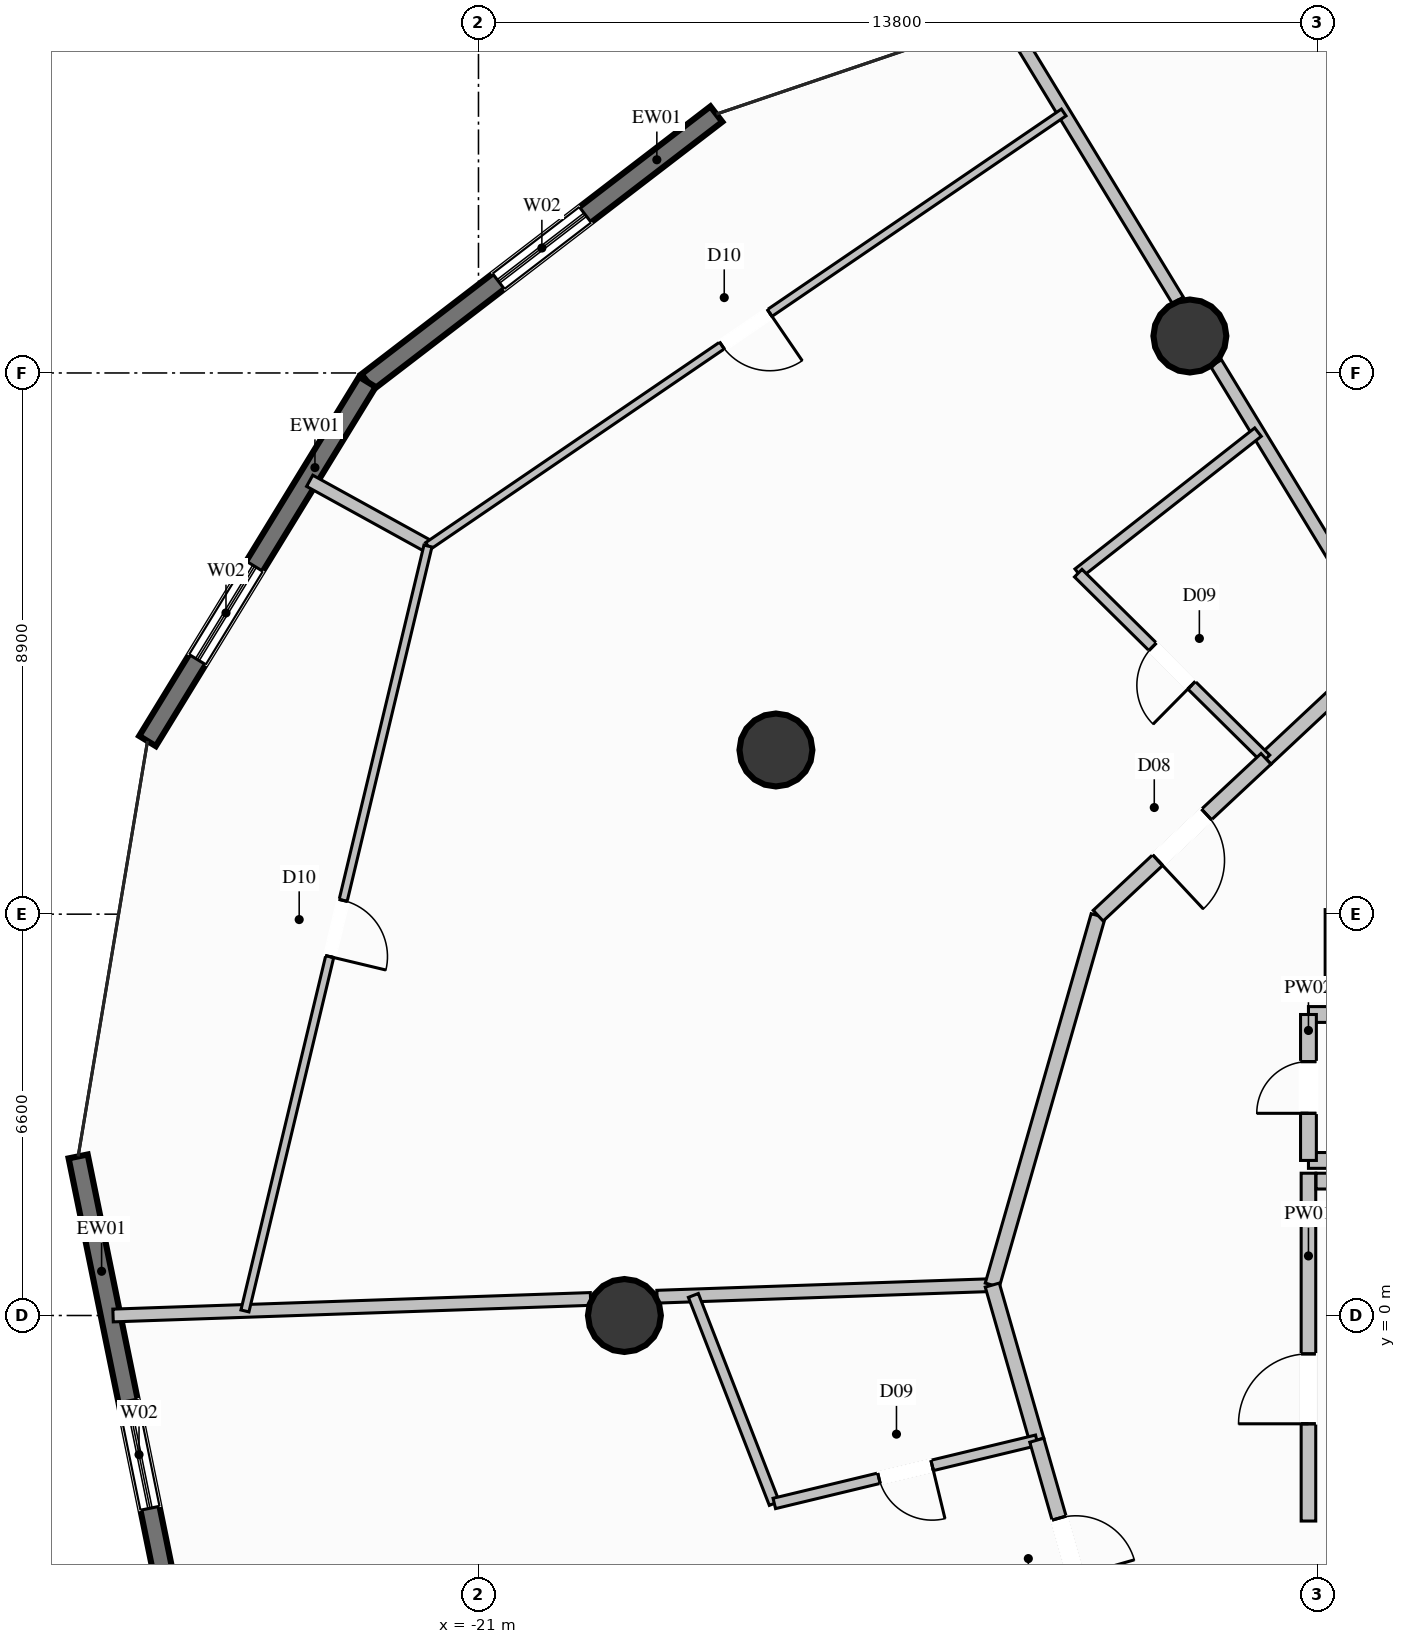
"""IFC4 building model, lengths in metres.
Left out: names, types, materials, properties, quantities, classifications, styles, units other than length and angle.
Written with IfcOpenShell. Run it as: python <this file> out.ifc"""

import sys

from ifc_helpers import new_model, si_unit, direction, frame, frame_2d, origin, origin_2d, place, context, subcontext, project, spatial, rectangle, circle, extrude, element, fill, save


model = new_model("IFC4")
c1 = context("Model", 3, precision=1e-05, world=origin(), true_north=direction((0.0, 1.0)))
c2 = subcontext(c1, "Body", "Model", "MODEL_VIEW")
j1 = project(units=[si_unit("LENGTHUNIT", "METRE"), si_unit("PLANEANGLEUNIT", "RADIAN")], contexts=[c1])
p1 = place(None, origin())
s1 = spatial("IfcSite", under=j1, at=p1, CompositionType="ELEMENT")
p2 = place(p1, origin())
s2 = spatial("IfcBuilding", under=s1, at=p2, CompositionType="ELEMENT")
p3 = place(p2, frame((0.0, 0.0, 75.2)))
s3 = spatial("IfcBuildingStorey", under=s2, at=p3, CompositionType="ELEMENT", Elevation=75.2)
p4 = place(p3, frame((-6.5, 6.1, 0.0), z_axis=(0.0, 0.0, 1.0), x_axis=(1.0, 0.0, 0.0)))
e1 = element("IfcColumn", 1, at=p4, inside=s3, PredefinedType="COLUMN", context=c2, shape_type="SweptSolid", body=[
    extrude(rectangle(XDim=1.1, YDim=1.1, at=origin_2d()), origin(), (0.0, 0.0, 1.0), 3.6),
])
for number, where, z_axis, x_axis in (
    (2, (-9.3, 16.108, 0.0), (0.0, 0.0, 1.0), (1.0, 0.0, 0.0)),
    (3, (-16.108, 9.3, 0.0), (0.0, 0.0, 1.0), (1.0, 0.0, 0.0)),
    (4, (-18.6, 0.0, 0.0), (0.0, 0.0, 1.0), (1.0, 0.0, 0.0)),
):
    element("IfcColumn", number, at=place(p3, frame(where, z_axis=z_axis, x_axis=x_axis)), inside=s3, PredefinedType="COLUMN", context=c2, shape_type="SweptSolid", body=[
        extrude(circle(Radius=0.6, at=origin_2d()), origin(), (0.0, 0.0, 1.0), 3.6),
    ])
p5 = place(p3, frame((-22.827, 15.353, 0.0), z_axis=(0.0, 0.0, 1.0), x_axis=(0.793329795388, 0.608792112095, 0.0)))
e5 = element("IfcWall", 5, at=p5, inside=s3, PredefinedType="SOLIDWALL", context=c2, shape_type="SweptSolid", body=[
    extrude(rectangle(XDim=7.234, YDim=0.32, at=frame_2d((3.617, 0.0))), origin(), (0.0, 0.0, 1.0), 3.34),
])
p6 = place(p5, frame((2.717, 0.0, 0.35)))
e6 = element("IfcOpeningElement", 6, at=p6, cuts=e5, PredefinedType="OPENING", context=c2, shape_type="SweptSolid", body=[
    extrude(rectangle(XDim=1.8, YDim=2.6, at=frame_2d((0.9, 1.3))), frame((0.0, 0.17, 0.0), z_axis=(0.0, -1.0, 0.0), x_axis=(1.0, 0.0, 0.0)), (0.0, 0.0, 1.0), 0.34),
])
p7 = place(p3, frame((-26.443, 9.447, 0.0), z_axis=(0.0, 0.0, 1.0), x_axis=(0.522184211397, 0.852832720625, 0.0)))
e7 = element("IfcWall", 7, at=p7, inside=s3, PredefinedType="SOLIDWALL", context=c2, shape_type="SweptSolid", body=[
    extrude(rectangle(XDim=6.925, YDim=0.32, at=frame_2d((3.462, 0.0))), origin(), (0.0, 0.0, 1.0), 3.34),
])
p8 = place(p7, frame((1.571, 0.0, 0.35)))
e8 = element("IfcOpeningElement", 8, at=p8, cuts=e7, PredefinedType="OPENING", context=c2, shape_type="SweptSolid", body=[
    extrude(rectangle(XDim=1.8, YDim=2.6, at=frame_2d((0.9, 1.3))), frame((0.0, 0.17, 0.0), z_axis=(0.0, -1.0, 0.0), x_axis=(1.0, 0.0, 0.0)), (0.0, 0.0, 1.0), 0.34),
])
p9 = place(p3, frame((-26.137, -4.471, 0.0), z_axis=(0.0, 0.0, 1.0), x_axis=(-0.200054576405, 0.979784755168, 0.0)))
e9 = element("IfcWall", 9, at=p9, inside=s3, PredefinedType="SOLIDWALL", context=c2, shape_type="SweptSolid", body=[
    extrude(rectangle(XDim=7.233, YDim=0.32, at=frame_2d((3.617, 0.0))), origin(), (0.0, 0.0, 1.0), 3.34),
])
p10 = place(p9, frame((1.328, 0.0, 0.35)))
e10 = element("IfcOpeningElement", 10, at=p10, cuts=e9, PredefinedType="OPENING", context=c2, shape_type="SweptSolid", body=[
    extrude(rectangle(XDim=1.8, YDim=2.6, at=frame_2d((0.9, 1.3))), frame((0.0, 0.17, 0.0), z_axis=(0.0, -1.0, 0.0), x_axis=(1.0, 0.0, 0.0)), (0.0, 0.0, 1.0), 0.34),
])
p11 = place(p3, frame((-7.35, -3.38, 0.0), z_axis=(0.0, 0.0, 1.0), x_axis=(0.0, 1.0, 0.0)))
e11 = element("IfcWall", 11, at=p11, inside=s3, PredefinedType="PARTITIONING", context=c2, shape_type="SweptSolid", body=[
    extrude(rectangle(XDim=5.72, YDim=0.24, at=frame_2d((2.86, 0.0))), origin(), (0.0, 0.0, 1.0), 2.425),
])
p12 = place(p11, frame((1.599, 0.0, 0.0)))
e12 = element("IfcOpeningElement", 12, at=p12, cuts=e11, PredefinedType="OPENING", context=c2, shape_type="SweptSolid", body=[
    extrude(rectangle(XDim=1.15, YDim=2.2, at=frame_2d((0.575, 1.1))), frame((0.0, 0.13, 0.0), z_axis=(0.0, -1.0, 0.0), x_axis=(1.0, 0.0, 0.0)), (0.0, 0.0, 1.0), 0.26),
])
p13 = place(p3, frame((-7.225, 2.21, 0.0), z_axis=(0.0, 0.0, 1.0), x_axis=(1.0, 0.0, 0.0)))
e13 = element("IfcWall", 13, at=p13, inside=s3, PredefinedType="PARTITIONING", context=c2, shape_type="SweptSolid", body=[
    extrude(rectangle(XDim=0.875, YDim=0.26, at=frame_2d((0.438, 0.0))), origin(), (0.0, 0.0, 1.0), 3.34),
])
for number, where, z_axis, x_axis in (
    (14, (-7.35, 4.95, 0.0), (0.0, 0.0, 1.0), (1.0, 0.0, 0.0)),
    (15, (-7.35, 2.55, 0.0), (0.0, 0.0, 1.0), (1.0, 0.0, 0.0)),
):
    element("IfcWall", number, at=place(p3, frame(where, z_axis=z_axis, x_axis=x_axis)), inside=s3, PredefinedType="PARTITIONING", context=c2, shape_type="SweptSolid", body=[
        extrude(rectangle(XDim=0.93, YDim=0.26, at=frame_2d((0.465, 0.0))), origin(), (0.0, 0.0, 1.0), 3.34),
    ])
p14 = place(p3, frame((-7.35, 2.55, 0.0), z_axis=(0.0, 0.0, 1.0), x_axis=(0.0, 1.0, 0.0)))
e16 = element("IfcWall", 16, at=p14, inside=s3, PredefinedType="PARTITIONING", context=c2, shape_type="SweptSolid", body=[
    extrude(rectangle(XDim=2.4, YDim=0.26, at=frame_2d((1.2, 0.0))), origin(), (0.0, 0.0, 1.0), 2.425),
])
p15 = place(p14, frame((0.775, 0.0, 0.0)))
e17 = element("IfcOpeningElement", 17, at=p15, cuts=e16, PredefinedType="OPENING", context=c2, shape_type="SweptSolid", body=[
    extrude(rectangle(XDim=0.85, YDim=2.05, at=frame_2d((0.425, 1.025))), frame((0.0, 0.14, 0.0), z_axis=(0.0, -1.0, 0.0), x_axis=(1.0, 0.0, 0.0)), (0.0, 0.0, 1.0), 0.28),
])
p16 = place(p3, frame((-6.05, 11.022, 0.0), z_axis=(0.0, 0.0, 1.0), x_axis=(-0.519360576882, 0.85455520078, 0.0)))
e18 = element("IfcWall", 18, at=p16, inside=s3, PredefinedType="PARTITIONING", context=c2, shape_type="SweptSolid", body=[
    extrude(rectangle(XDim=5.43, YDim=0.21, at=frame_2d((2.715, 0.0))), origin(), (0.0, 0.0, 1.0), 2.709),
])
p17 = place(p3, frame((-9.498, 16.695, 0.0), z_axis=(0.0, 0.0, 1.0), x_axis=(-0.519352781988, 0.854559938121, 0.0)))
e19 = element("IfcWall", 19, at=p17, inside=s3, PredefinedType="PARTITIONING", context=c2, shape_type="SweptSolid", body=[
    extrude(rectangle(XDim=5.424, YDim=0.21, at=frame_2d((2.712, 0.0))), origin(), (0.0, 0.0, 1.0), 3.34),
])
p18 = place(p3, frame((-12.55, 0.5, 0.0), z_axis=(0.0, 0.0, 1.0), x_axis=(-0.999400889754, -0.034610136654, 0.0)))
e20 = element("IfcWall", 20, at=p18, inside=s3, PredefinedType="PARTITIONING", context=c2, shape_type="SweptSolid", body=[
    extrude(rectangle(XDim=5.516, YDim=0.21, at=frame_2d((2.758, 0.0))), origin(), (0.0, 0.0, 1.0), 2.42),
])
p19 = place(p3, frame((-19.157, 0.272, 0.0), z_axis=(0.0, 0.0, 1.0), x_axis=(-0.999400822075, -0.034612090897, 0.0)))
e21 = element("IfcWall", 21, at=p19, inside=s3, PredefinedType="PARTITIONING", context=c2, shape_type="SweptSolid", body=[
    extrude(rectangle(XDim=7.858, YDim=0.21, at=frame_2d((3.929, 0.0))), origin(), (0.0, 0.0, 1.0), 2.42),
])
p20 = place(p3, frame((-6.05, 11.022, 0.0), z_axis=(0.0, 0.0, 1.0), x_axis=(-0.730494026404, -0.682919085535, 0.0)))
e22 = element("IfcWall", 22, at=p20, inside=s3, PredefinedType="PARTITIONING", context=c2, shape_type="SweptSolid", body=[
    extrude(rectangle(XDim=2.735, YDim=0.24, at=frame_2d((1.368, 0.0))), origin(), (0.0, 0.0, 1.0), 3.34),
])
p21 = place(p3, frame((-8.18, 14.527, 0.0), z_axis=(0.0, 0.0, 1.0), x_axis=(-0.786773597638, -0.617241691771, 0.0)))
e23 = element("IfcWall", 23, at=p21, inside=s3, PredefinedType="PLUMBINGWALL", context=c2, shape_type="SweptSolid", body=[
    extrude(rectangle(XDim=3.757, YDim=0.175, at=frame_2d((1.878, 0.0))), origin(), (0.0, 0.0, 1.0), 3.34),
])
p22 = place(p3, frame((-8.048, 9.154, 0.0), z_axis=(0.0, 0.0, 1.0), x_axis=(-0.711002906065, 0.703189069573, 0.0)))
e24 = element("IfcWall", 24, at=p22, inside=s3, PredefinedType="PLUMBINGWALL", context=c2, shape_type="SweptSolid", body=[
    extrude(rectangle(XDim=4.343, YDim=0.175, at=frame_2d((2.171, 0.0))), origin(), (0.0, 0.0, 1.0), 3.34),
])
p23 = place(p22, frame((1.722, 0.0, 0.0)))
e25 = element("IfcOpeningElement", 25, at=p23, cuts=e24, PredefinedType="OPENING", context=c2, shape_type="SweptSolid", body=[
    extrude(rectangle(XDim=0.9, YDim=2.1, at=frame_2d((0.45, 1.05))), frame((0.0, 0.098, 0.0), z_axis=(0.0, -1.0, 0.0), x_axis=(1.0, 0.0, 0.0)), (0.0, 0.0, 1.0), 0.195),
])
p24 = place(p3, frame((-21.831, 12.654, 0.0), z_axis=(0.0, 0.0, 1.0), x_axis=(-0.875579287151, 0.483074437237, 0.0)))
e26 = element("IfcWall", 26, at=p24, inside=s3, PredefinedType="PARTITIONING", context=c2, shape_type="SweptSolid", body=[
    extrude(rectangle(XDim=2.221, YDim=0.21, at=frame_2d((1.111, 0.0))), origin(), (0.0, 0.0, 1.0), 3.34),
])
p25 = place(p3, frame((-10.808, 6.575, 0.0), z_axis=(0.0, 0.0, 1.0), x_axis=(-0.275634306148, -0.961262570412, 0.0)))
e27 = element("IfcWall", 27, at=p25, inside=s3, PredefinedType="PARTITIONING", context=c2, shape_type="SweptSolid", body=[
    extrude(rectangle(XDim=6.32, YDim=0.24, at=frame_2d((3.16, 0.0))), origin(), (0.0, 0.0, 1.0), 3.34),
])
p26 = place(p3, frame((-8.048, 9.154, 0.0), z_axis=(0.0, 0.0, 1.0), x_axis=(-0.73064678366, -0.682755649941, 0.0)))
e28 = element("IfcWall", 28, at=p26, inside=s3, PredefinedType="PARTITIONING", context=c2, shape_type="SweptSolid", body=[
    extrude(rectangle(XDim=3.778, YDim=0.24, at=frame_2d((1.889, 0.0))), origin(), (0.0, 0.0, 1.0), 3.34),
])
p27 = place(p26, frame((1.339, 0.0, 0.0)))
e29 = element("IfcOpeningElement", 29, at=p27, cuts=e28, PredefinedType="OPENING", context=c2, shape_type="SweptSolid", body=[
    extrude(rectangle(XDim=1.1, YDim=2.3, at=frame_2d((0.55, 1.15))), frame((0.0, 0.13, 0.0), z_axis=(0.0, -1.0, 0.0), x_axis=(1.0, 0.0, 0.0)), (0.0, 0.0, 1.0), 0.26),
])
p28 = place(p3, frame((-11.375, 19.784, 0.0), z_axis=(0.0, 0.0, 1.0), x_axis=(-0.826199588729, -0.563377528469, 0.0)))
e30 = element("IfcWall", 30, at=p28, inside=s3, PredefinedType="PARTITIONING", context=c2, shape_type="SweptSolid", body=[
    extrude(rectangle(XDim=12.656, YDim=0.135, at=frame_2d((6.328, 0.0))), origin(), (0.0, 0.0, 1.0), 3.34),
])
p29 = place(p28, frame((5.853, 0.0, 0.0)))
e31 = element("IfcOpeningElement", 31, at=p29, cuts=e30, PredefinedType="OPENING", context=c2, shape_type="SweptSolid", body=[
    extrude(rectangle(XDim=0.95, YDim=2.1, at=frame_2d((0.475, 1.05))), frame((0.0, 0.078, 0.0), z_axis=(0.0, -1.0, 0.0), x_axis=(1.0, 0.0, 0.0)), (0.0, 0.0, 1.0), 0.155),
])
p30 = place(p3, frame((-21.831, 12.654, 0.0), z_axis=(0.0, 0.0, 1.0), x_axis=(-0.232716823602, -0.972544538832, 0.0)))
e32 = element("IfcWall", 32, at=p30, inside=s3, PredefinedType="PARTITIONING", context=c2, shape_type="SweptSolid", body=[
    extrude(rectangle(XDim=12.934, YDim=0.135, at=frame_2d((6.467, 0.0))), origin(), (0.0, 0.0, 1.0), 3.34),
])
p31 = place(p30, frame((5.992, 0.0, 0.0)))
e33 = element("IfcOpeningElement", 33, at=p31, cuts=e32, PredefinedType="OPENING", context=c2, shape_type="SweptSolid", body=[
    extrude(rectangle(XDim=0.95, YDim=2.1, at=frame_2d((0.475, 1.05))), frame((0.0, 0.078, 0.0), z_axis=(0.0, -1.0, 0.0), x_axis=(1.0, 0.0, 0.0)), (0.0, 0.0, 1.0), 0.155),
])
p32 = place(p3, frame((-12.55, 0.5, 0.0), z_axis=(0.0, 0.0, 1.0), x_axis=(0.275790140823, -0.961217872402, 0.0)))
e34 = element("IfcWall", 34, at=p32, inside=s3, PredefinedType="PARTITIONING", context=c2, shape_type="SweptSolid", body=[
    extrude(rectangle(XDim=2.654, YDim=0.24, at=frame_2d((1.327, 0.0))), origin(), (0.0, 0.0, 1.0), 3.34),
])
p33 = place(p3, frame((-17.466, 0.33, 0.0), z_axis=(0.0, 0.0, 1.0), x_axis=(0.362590680008, -0.931948495772, 0.0)))
e35 = element("IfcWall", 35, at=p33, inside=s3, PredefinedType="PLUMBINGWALL", context=c2, shape_type="SweptSolid", body=[
    extrude(rectangle(XDim=3.671, YDim=0.175, at=frame_2d((1.835, 0.0))), origin(), (0.0, 0.0, 1.0), 3.34),
])
p34 = place(p3, frame((-11.818, -2.051, 0.0), z_axis=(0.0, 0.0, 1.0), x_axis=(-0.972183308893, -0.234221292607, 0.0)))
e36 = element("IfcWall", 36, at=p34, inside=s3, PredefinedType="PLUMBINGWALL", context=c2, shape_type="SweptSolid", body=[
    extrude(rectangle(XDim=4.44, YDim=0.175, at=frame_2d((2.22, 0.0))), origin(), (0.0, 0.0, 1.0), 3.34),
])
p35 = place(p34, frame((1.77, 0.0, 0.0)))
e37 = element("IfcOpeningElement", 37, at=p35, cuts=e36, PredefinedType="OPENING", context=c2, shape_type="SweptSolid", body=[
    extrude(rectangle(XDim=0.9, YDim=2.1, at=frame_2d((0.45, 1.05))), frame((0.0, 0.098, 0.0), z_axis=(0.0, -1.0, 0.0), x_axis=(1.0, 0.0, 0.0)), (0.0, 0.0, 1.0), 0.195),
])
p36 = place(p3, frame((-11.818, -2.051, 0.0), z_axis=(0.0, 0.0, 1.0), x_axis=(0.275521481409, -0.961294914832, 0.0)))
e38 = element("IfcWall", 38, at=p36, inside=s3, PredefinedType="PARTITIONING", context=c2, shape_type="SweptSolid", body=[
    extrude(rectangle(XDim=3.666, YDim=0.24, at=frame_2d((1.833, 0.0))), origin(), (0.0, 0.0, 1.0), 3.34),
])
p37 = place(p36, frame((1.333, 0.0, 0.0)))
e39 = element("IfcOpeningElement", 39, at=p37, cuts=e38, PredefinedType="OPENING", context=c2, shape_type="SweptSolid", body=[
    extrude(rectangle(XDim=1.0, YDim=2.2, at=frame_2d((0.5, 1.1))), frame((0.0, 0.13, 0.0), z_axis=(0.0, -1.0, 0.0), x_axis=(1.0, 0.0, 0.0)), (0.0, 0.0, 1.0), 0.26),
])
p38 = place(p6, origin())
e40 = element("IfcWindow", 40, at=p38, inside=s3, PartitioningType="SINGLE_PANEL", PredefinedType="WINDOW", context=c2, shape_type="SweptSolid", body=[
    extrude(rectangle(XDim=1.8, YDim=2.6, at=frame_2d((0.9, 1.3))), frame((0.0, 0.03, 0.0), z_axis=(0.0, -1.0, 0.0), x_axis=(1.0, 0.0, 0.0)), (0.0, 0.0, 1.0), 0.06),
])
fill(e6, e40)
p39 = place(p8, origin())
e41 = element("IfcWindow", 41, at=p39, inside=s3, PartitioningType="SINGLE_PANEL", PredefinedType="WINDOW", context=c2, shape_type="SweptSolid", body=[
    extrude(rectangle(XDim=1.8, YDim=2.6, at=frame_2d((0.9, 1.3))), frame((0.0, 0.03, 0.0), z_axis=(0.0, -1.0, 0.0), x_axis=(1.0, 0.0, 0.0)), (0.0, 0.0, 1.0), 0.06),
])
fill(e8, e41)
p40 = place(p10, origin())
e42 = element("IfcWindow", 42, at=p40, inside=s3, PartitioningType="SINGLE_PANEL", PredefinedType="WINDOW", context=c2, shape_type="SweptSolid", body=[
    extrude(rectangle(XDim=1.8, YDim=2.6, at=frame_2d((0.9, 1.3))), frame((0.0, 0.03, 0.0), z_axis=(0.0, -1.0, 0.0), x_axis=(1.0, 0.0, 0.0)), (0.0, 0.0, 1.0), 0.06),
])
fill(e10, e42)
p41 = place(p12, origin())
e43 = element("IfcDoor", 43, at=p41, inside=s3, OperationType="SINGLE_SWING_LEFT", PredefinedType="DOOR", context=c2, shape_type="SweptSolid", body=[
    extrude(rectangle(XDim=1.15, YDim=2.2, at=frame_2d((0.575, 1.1))), frame((0.0, 0.025, 0.0), z_axis=(0.0, -1.0, 0.0), x_axis=(1.0, 0.0, 0.0)), (0.0, 0.0, 1.0), 0.05),
])
fill(e12, e43)
p42 = place(p15, origin())
e44 = element("IfcDoor", 44, at=p42, inside=s3, OperationType="SINGLE_SWING_LEFT", PredefinedType="DOOR", context=c2, shape_type="SweptSolid", body=[
    extrude(rectangle(XDim=0.85, YDim=2.05, at=frame_2d((0.425, 1.025))), frame((0.0, 0.025, 0.0), z_axis=(0.0, -1.0, 0.0), x_axis=(1.0, 0.0, 0.0)), (0.0, 0.0, 1.0), 0.05),
])
fill(e17, e44)
p43 = place(p23, origin())
e45 = element("IfcDoor", 45, at=p43, inside=s3, OperationType="SINGLE_SWING_LEFT", PredefinedType="DOOR", context=c2, shape_type="SweptSolid", body=[
    extrude(rectangle(XDim=0.9, YDim=2.1, at=frame_2d((0.45, 1.05))), frame((0.0, 0.025, 0.0), z_axis=(0.0, -1.0, 0.0), x_axis=(1.0, 0.0, 0.0)), (0.0, 0.0, 1.0), 0.05),
])
fill(e25, e45)
p44 = place(p27, origin())
e46 = element("IfcDoor", 46, at=p44, inside=s3, OperationType="SINGLE_SWING_RIGHT", PredefinedType="DOOR", context=c2, shape_type="SweptSolid", body=[
    extrude(rectangle(XDim=1.1, YDim=2.3, at=frame_2d((0.55, 1.15))), frame((0.0, 0.025, 0.0), z_axis=(0.0, -1.0, 0.0), x_axis=(1.0, 0.0, 0.0)), (0.0, 0.0, 1.0), 0.05),
])
fill(e29, e46)
p45 = place(p29, origin())
e47 = element("IfcDoor", 47, at=p45, inside=s3, OperationType="SINGLE_SWING_LEFT", PredefinedType="DOOR", context=c2, shape_type="SweptSolid", body=[
    extrude(rectangle(XDim=0.95, YDim=2.1, at=frame_2d((0.475, 1.05))), frame((0.0, 0.025, 0.0), z_axis=(0.0, -1.0, 0.0), x_axis=(1.0, 0.0, 0.0)), (0.0, 0.0, 1.0), 0.05),
])
fill(e31, e47)
p46 = place(p31, origin())
e48 = element("IfcDoor", 48, at=p46, inside=s3, OperationType="SINGLE_SWING_RIGHT", PredefinedType="DOOR", context=c2, shape_type="SweptSolid", body=[
    extrude(rectangle(XDim=0.95, YDim=2.1, at=frame_2d((0.475, 1.05))), frame((0.0, 0.025, 0.0), z_axis=(0.0, -1.0, 0.0), x_axis=(1.0, 0.0, 0.0)), (0.0, 0.0, 1.0), 0.05),
])
fill(e33, e48)
p47 = place(p35, origin())
e49 = element("IfcDoor", 49, at=p47, inside=s3, OperationType="SINGLE_SWING_LEFT", PredefinedType="DOOR", context=c2, shape_type="SweptSolid", body=[
    extrude(rectangle(XDim=0.9, YDim=2.1, at=frame_2d((0.45, 1.05))), frame((0.0, 0.025, 0.0), z_axis=(0.0, -1.0, 0.0), x_axis=(1.0, 0.0, 0.0)), (0.0, 0.0, 1.0), 0.05),
])
fill(e37, e49)
p48 = place(p37, origin())
e50 = element("IfcDoor", 50, at=p48, inside=s3, OperationType="SINGLE_SWING_RIGHT", PredefinedType="DOOR", context=c2, shape_type="SweptSolid", body=[
    extrude(rectangle(XDim=1.0, YDim=2.2, at=frame_2d((0.5, 1.1))), frame((0.0, 0.025, 0.0), z_axis=(0.0, -1.0, 0.0), x_axis=(1.0, 0.0, 0.0)), (0.0, 0.0, 1.0), 0.05),
])
fill(e39, e50)
save(model, sys.argv[1])
